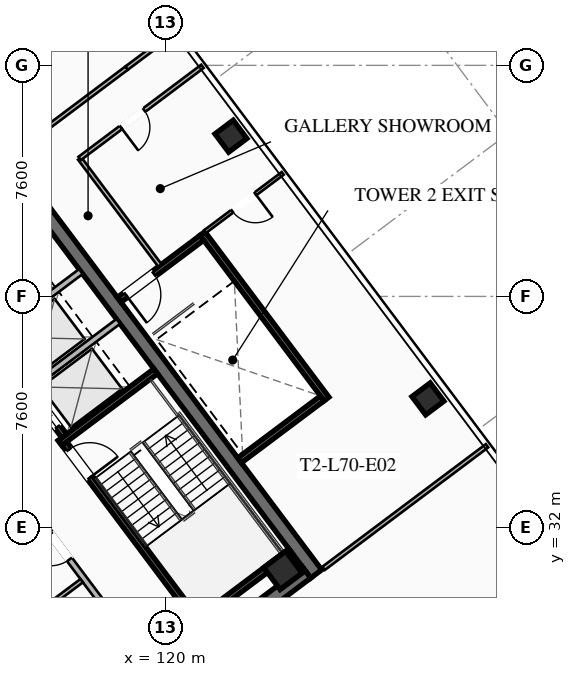
"""IFC4 building model, lengths in metres.
Left out: names, types, materials, properties, quantities, classifications, styles, units other than length and angle.
Written with IfcOpenShell. Run it as: python <this file> out.ifc"""

import sys

from ifc_helpers import new_model, si_unit, direction, frame, frame_2d, origin, origin_2d, place, context, subcontext, project, spatial, rectangle, hollow_rectangle, extrude, element, fill, save


model = new_model("IFC4")
c1 = context("Model", 3, precision=1e-05, world=origin(), true_north=direction((0.0, 1.0)))
c2 = subcontext(c1, "Body", "Model", "MODEL_VIEW")
j1 = project(units=[si_unit("LENGTHUNIT", "METRE"), si_unit("PLANEANGLEUNIT", "RADIAN")], contexts=[c1])
p1 = place(None, origin())
s1 = spatial("IfcSite", under=j1, at=p1, CompositionType="ELEMENT")
p2 = place(p1, origin())
s2 = spatial("IfcBuilding", under=s1, at=p2, CompositionType="ELEMENT")
p3 = place(p2, frame((0.0, 0.0, 259.4)))
s3 = spatial("IfcBuildingStorey", under=s2, at=p3, CompositionType="ELEMENT", Elevation=259.4)
p4 = place(p3, frame((115.604, 42.953, 0.0), z_axis=(0.0, 0.0, 1.0), x_axis=(0.600005007985, -0.799996243986, 0.0)))
e1 = element("IfcWall", 1, at=p4, inside=s3, PredefinedType="SHEAR", context=c2, shape_type="SweptSolid", body=[
    extrude(rectangle(XDim=15.6, YDim=0.45, at=frame_2d((7.8, 0.0))), origin(), (0.0, 0.0, 1.0), 4.0),
])
p5 = place(p3, frame((124.649, 30.518, 0.0), z_axis=(0.0, 0.0, 1.0), x_axis=(-0.8, -0.6, 0.0)))
e2 = element("IfcWall", 2, at=p5, inside=s3, PredefinedType="SHEAR", context=c2, shape_type="SweptSolid", body=[
    extrude(rectangle(XDim=15.26, YDim=0.45, at=frame_2d((7.63, 0.0))), origin(), (0.0, 0.0, 1.0), 4.0),
])
p6 = place(p5, frame((9.33, 0.0, 0.0)))
e3 = element("IfcOpeningElement", 3, at=p6, cuts=e2, PredefinedType="OPENING", context=c2, shape_type="SweptSolid", body=[
    extrude(rectangle(XDim=1.25, YDim=2.25, at=frame_2d((0.625, 1.125))), frame((0.0, 0.235, 0.0), z_axis=(0.0, -1.0, 0.0), x_axis=(1.0, 0.0, 0.0)), (0.0, 0.0, 1.0), 0.47),
])
p7 = place(p5, frame((4.28, 0.0, 0.0)))
e4 = element("IfcOpeningElement", 4, at=p7, cuts=e2, PredefinedType="OPENING", context=c2, shape_type="SweptSolid", body=[
    extrude(rectangle(XDim=1.25, YDim=2.25, at=frame_2d((0.625, 1.125))), frame((0.0, 0.235, 0.0), z_axis=(0.0, -1.0, 0.0), x_axis=(1.0, 0.0, 0.0)), (0.0, 0.0, 1.0), 0.47),
])
p8 = place(p3, frame((123.87, 30.59, 0.0), z_axis=(0.0, 0.0, 1.0), x_axis=(0.799999996291, 0.600000004945, 0.0)))
e5 = element("IfcColumn", 5, at=p8, inside=s3, PredefinedType="COLUMN", context=c2, shape_type="SweptSolid", body=[
    extrude(hollow_rectangle(XDim=0.9, YDim=0.9, WallThickness=0.04, at=origin_2d()), origin(), (0.0, 0.0, 1.0), 3.7),
])
for number, where, z_axis, x_axis in (
    (6, (128.64, 36.23, 0.0), (0.0, 0.0, 1.0), (0.8, 0.6, 0.0)),
    (7, (122.16, 44.87, 0.0), (0.0, 0.0, 1.0), (0.8, 0.6, 0.0)),
):
    element("IfcColumn", number, at=place(p3, frame(where, z_axis=z_axis, x_axis=x_axis)), inside=s3, PredefinedType="COLUMN", context=c2, shape_type="SweptSolid", body=[
        extrude(hollow_rectangle(XDim=0.75, YDim=0.75, WallThickness=0.032, at=origin_2d()), origin(), (0.0, 0.0, 1.0), 3.7),
    ])
p9 = place(p3, frame((116.56, 34.92, 0.0), z_axis=(0.0, 0.0, 1.0), x_axis=(0.59999041401, -0.800007189403, 0.0)))
e8 = element("IfcWall", 8, at=p9, inside=s3, PredefinedType="SHEAR", context=c2, shape_type="SweptSolid", body=[
    extrude(rectangle(XDim=8.15, YDim=0.2, at=frame_2d((4.075, 0.0))), origin(), (0.0, 0.0, 1.0), 3.7),
])
p10 = place(p9, frame((0.45, 0.0, 0.0)))
e9 = element("IfcOpeningElement", 9, at=p10, cuts=e8, PredefinedType="OPENING", context=c2, shape_type="SweptSolid", body=[
    extrude(rectangle(XDim=1.15, YDim=2.2, at=frame_2d((0.575, 1.1))), frame((0.0, 0.11, 0.0), z_axis=(0.0, -1.0, 0.0), x_axis=(1.0, 0.0, 0.0)), (0.0, 0.0, 1.0), 0.22),
])
for number, where, z_axis, x_axis in (
    (10, (116.54, 34.78, 0.0), (0.0, 0.0, 1.0), (0.8, 0.6, 0.0)),
    (11, (120.98, 28.86, 0.0), (0.0, 0.0, 1.0), (0.8, 0.6, 0.0)),
):
    element("IfcWall", number, at=place(p3, frame(where, z_axis=z_axis, x_axis=x_axis)), inside=s3, PredefinedType="SHEAR", context=c2, shape_type="SweptSolid", body=[
        extrude(rectangle(XDim=3.93, YDim=0.2, at=frame_2d((1.965, 0.0))), origin(), (0.0, 0.0, 1.0), 3.7),
    ])
p11 = place(p3, frame((118.058, 25.856, 0.0), z_axis=(0.0, 0.0, 1.0), x_axis=(-0.600002657301, 0.799998007018, 0.0)))
e12 = element("IfcWall", 12, at=p11, inside=s3, PredefinedType="SHEAR", context=c2, shape_type="SweptSolid", body=[
    extrude(rectangle(XDim=14.7, YDim=0.2, at=frame_2d((7.35, 0.0))), origin(), (0.0, 0.0, 1.0), 3.7),
])
p12 = place(p3, frame((112.75, 40.25, 0.0), z_axis=(0.0, 0.0, 1.0), x_axis=(0.599994036198, -0.800004472816, 0.0)))
e13 = element("IfcWall", 13, at=p12, inside=s3, PredefinedType="SHEAR", context=c2, shape_type="SweptSolid", body=[
    extrude(rectangle(XDim=6.55, YDim=0.2, at=frame_2d((3.275, 0.0))), origin(), (0.0, 0.0, 1.0), 3.7),
])
p13 = place(p12, frame((5.075, 0.0, 0.0)))
e14 = element("IfcOpeningElement", 14, at=p13, cuts=e13, PredefinedType="OPENING", context=c2, shape_type="SweptSolid", body=[
    extrude(rectangle(XDim=1.1, YDim=2.2, at=frame_2d((0.55, 1.1))), frame((0.0, 0.11, 0.0), z_axis=(0.0, -1.0, 0.0), x_axis=(1.0, 0.0, 0.0)), (0.0, 0.0, 1.0), 0.22),
])
p14 = place(p12, frame((3.025, 0.0, 0.0)))
e15 = element("IfcOpeningElement", 15, at=p14, cuts=e13, PredefinedType="OPENING", context=c2, shape_type="SweptSolid", body=[
    extrude(rectangle(XDim=1.1, YDim=2.2, at=frame_2d((0.55, 1.1))), frame((0.0, 0.11, 0.0), z_axis=(0.0, -1.0, 0.0), x_axis=(1.0, 0.0, 0.0)), (0.0, 0.0, 1.0), 0.22),
])
p15 = place(p12, frame((1.025, 0.0, 0.0)))
e16 = element("IfcOpeningElement", 16, at=p15, cuts=e13, PredefinedType="OPENING", context=c2, shape_type="SweptSolid", body=[
    extrude(rectangle(XDim=1.1, YDim=2.2, at=frame_2d((0.55, 1.1))), frame((0.0, 0.11, 0.0), z_axis=(0.0, -1.0, 0.0), x_axis=(1.0, 0.0, 0.0)), (0.0, 0.0, 1.0), 0.22),
])
for number, where, z_axis, x_axis in (
    (17, (115.59, 36.63, 0.0), (0.0, 0.0, 1.0), (0.8, 0.6, 0.0)),
    (18, (114.36, 38.27, 0.0), (0.0, 0.0, 1.0), (0.8, 0.6, 0.0)),
):
    element("IfcWall", number, at=place(p3, frame(where, z_axis=z_axis, x_axis=x_axis)), inside=s3, PredefinedType="SOLIDWALL", context=c2, shape_type="SweptSolid", body=[
        extrude(rectangle(XDim=3.58, YDim=0.2, at=frame_2d((1.79, 0.0))), origin(), (0.0, 0.0, 1.0), 3.7),
    ])
p16 = place(p3, frame((119.73, 27.11, 0.0), z_axis=(0.0, 0.0, 1.0), x_axis=(-0.600005580459, 0.799995814625, 0.0)))
e19 = element("IfcWall", 19, at=p16, inside=s3, PredefinedType="SOLIDWALL", context=c2, shape_type="SweptSolid", body=[
    extrude(rectangle(XDim=7.0, YDim=0.2, at=frame_2d((3.5, 0.0))), origin(), (0.0, 0.0, 1.0), 2.659),
])
p17 = place(p16, frame((0.85, 0.0, 0.0)))
e20 = element("IfcOpeningElement", 20, at=p17, cuts=e19, PredefinedType="OPENING", context=c2, shape_type="SweptSolid", body=[
    extrude(rectangle(XDim=0.95, YDim=2.05, at=frame_2d((0.475, 1.025))), frame((0.0, 0.11, 0.0), z_axis=(0.0, -1.0, 0.0), x_axis=(1.0, 0.0, 0.0)), (0.0, 0.0, 1.0), 0.22),
])
p18 = place(p16, frame((4.8, 0.0, 0.0)))
e21 = element("IfcOpeningElement", 21, at=p18, cuts=e19, PredefinedType="OPENING", context=c2, shape_type="SweptSolid", body=[
    extrude(rectangle(XDim=1.05, YDim=2.2, at=frame_2d((0.525, 1.1))), frame((0.0, 0.11, 0.0), z_axis=(0.0, -1.0, 0.0), x_axis=(1.0, 0.0, 0.0)), (0.0, 0.0, 1.0), 0.22),
])
p19 = place(p3, frame((115.746, 29.122, 0.0), z_axis=(0.0, 0.0, 1.0), x_axis=(0.8, 0.6, 0.0)))
e22 = element("IfcWall", 22, at=p19, inside=s3, PredefinedType="PARTITIONING", context=c2, shape_type="SweptSolid", body=[
    extrude(rectangle(XDim=1.88, YDim=0.135, at=frame_2d((0.94, 0.0))), origin(), (0.0, 0.0, 1.0), 2.659),
])
p20 = place(p3, frame((125.304, 36.228, 0.0), z_axis=(0.0, 0.0, 1.0), x_axis=(-0.59998851072, 0.800008616831, 0.0)))
e23 = element("IfcWall", 23, at=p20, inside=s3, PredefinedType="SHEAR", context=c2, shape_type="SweptSolid", body=[
    extrude(rectangle(XDim=6.8, YDim=0.2, at=frame_2d((3.4, 0.0))), origin(), (0.0, 0.0, 1.0), 3.7),
])
p21 = place(p3, frame((121.204, 41.528, 0.0), z_axis=(0.0, 0.0, 1.0), x_axis=(-0.800017232136, -0.599977023131, 0.0)))
e24 = element("IfcWall", 24, at=p21, inside=s3, PredefinedType="SHEAR", context=c2, shape_type="SweptSolid", body=[
    extrude(rectangle(XDim=3.4, YDim=0.2, at=frame_2d((1.7, 0.0))), origin(), (0.0, 0.0, 1.0), 3.7),
])
p22 = place(p21, frame((1.975, 0.0, 0.0)))
e25 = element("IfcOpeningElement", 25, at=p22, cuts=e24, PredefinedType="OPENING", context=c2, shape_type="SweptSolid", body=[
    extrude(rectangle(XDim=1.15, YDim=2.2, at=frame_2d((0.575, 1.1))), frame((0.0, 0.11, 0.0), z_axis=(0.0, -1.0, 0.0), x_axis=(1.0, 0.0, 0.0)), (0.0, 0.0, 1.0), 0.22),
])
p23 = place(p3, frame((122.444, 34.208, 0.0), z_axis=(0.0, 0.0, 1.0), x_axis=(0.79999138319, 0.600011488909, 0.0)))
e26 = element("IfcWall", 26, at=p23, inside=s3, PredefinedType="SHEAR", context=c2, shape_type="SweptSolid", body=[
    extrude(rectangle(XDim=3.4, YDim=0.2, at=frame_2d((1.7, 0.0))), origin(), (0.0, 0.0, 1.0), 3.7),
])
p24 = place(p3, frame((119.824, 40.618, 0.0), z_axis=(0.0, 0.0, 1.0), x_axis=(-0.599982243973, 0.800013316712, 0.0)))
e27 = element("IfcWall", 27, at=p24, inside=s3, PredefinedType="PARTITIONING", context=c2, shape_type="SweptSolid", body=[
    extrude(rectangle(XDim=4.4, YDim=0.135, at=frame_2d((2.2, 0.0))), origin(), (0.0, 0.0, 1.0), 2.659),
])
p25 = place(p3, frame((99.65, 32.8, 0.0), z_axis=(0.0, 0.0, 1.0), x_axis=(0.8, 0.6, 0.0)))
e28 = element("IfcWall", 28, at=p25, inside=s3, PredefinedType="PARTITIONING", context=c2, shape_type="SweptSolid", body=[
    extrude(rectangle(XDim=23.85, YDim=0.135, at=frame_2d((11.925, 0.0))), origin(), (0.0, 0.0, 1.0), 2.659),
])
p26 = place(p25, frame((6.567, 0.0, 0.0)))
e29 = element("IfcOpeningElement", 29, at=p26, cuts=e28, PredefinedType="OPENING", context=c2, shape_type="SweptSolid", body=[
    extrude(rectangle(XDim=0.95, YDim=2.05, at=frame_2d((0.475, 1.025))), frame((0.0, 0.077, 0.0), z_axis=(0.0, -1.0, 0.0), x_axis=(1.0, 0.0, 0.0)), (0.0, 0.0, 1.0), 0.155),
])
p27 = place(p25, frame((10.788, 0.0, 0.0)))
e30 = element("IfcOpeningElement", 30, at=p27, cuts=e28, PredefinedType="OPENING", context=c2, shape_type="SweptSolid", body=[
    extrude(rectangle(XDim=0.95, YDim=2.05, at=frame_2d((0.475, 1.025))), frame((0.0, 0.077, 0.0), z_axis=(0.0, -1.0, 0.0), x_axis=(1.0, 0.0, 0.0)), (0.0, 0.0, 1.0), 0.155),
])
p28 = place(p3, frame((118.73, 47.11, 0.0), z_axis=(0.0, 0.0, 1.0), x_axis=(0.800057727462, 0.599923022336, 0.0)))
e31 = element("IfcWall", 31, at=p28, inside=s3, PredefinedType="PARTITIONING", context=c2, shape_type="SweptSolid", body=[
    extrude(rectangle(XDim=2.03, YDim=0.135, at=frame_2d((1.015, 0.0))), origin(), (0.0, 0.0, 1.0), 2.659),
])
p29 = place(p3, frame((121.224, 47.168, 0.0), z_axis=(0.0, 0.0, 1.0), x_axis=(-0.8, -0.6, 0.0)))
e32 = element("IfcWall", 32, at=p29, inside=s3, PredefinedType="PARTITIONING", context=c2, shape_type="SweptSolid", body=[
    extrude(rectangle(XDim=5.05, YDim=0.135, at=frame_2d((2.525, 0.0))), origin(), (0.0, 0.0, 1.0), 2.659),
])
p30 = place(p29, frame((2.4, 0.0, 0.0)))
e33 = element("IfcOpeningElement", 33, at=p30, cuts=e32, PredefinedType="OPENING", context=c2, shape_type="SweptSolid", body=[
    extrude(rectangle(XDim=0.95, YDim=2.05, at=frame_2d((0.475, 1.025))), frame((0.0, 0.077, 0.0), z_axis=(0.0, -1.0, 0.0), x_axis=(1.0, 0.0, 0.0)), (0.0, 0.0, 1.0), 0.155),
])
p31 = place(p3, frame((125.208, 30.656, 0.0), z_axis=(0.0, 0.0, 1.0), x_axis=(0.8, 0.6, 0.0)))
e34 = element("IfcWall", 34, at=p31, inside=s3, PredefinedType="PARTITIONING", context=c2, shape_type="SweptSolid", body=[
    extrude(rectangle(XDim=6.72, YDim=0.135, at=frame_2d((3.36, 0.0))), origin(), (0.0, 0.0, 1.0), 2.659),
])
p32 = place(p3, frame((123.864, 43.648, 0.0), z_axis=(0.0, 0.0, 1.0), x_axis=(-0.800018310174, -0.599975585658, 0.0)))
e35 = element("IfcWall", 35, at=p32, inside=s3, PredefinedType="PARTITIONING", context=c2, shape_type="SweptSolid", body=[
    extrude(rectangle(XDim=3.2, YDim=0.11, at=frame_2d((1.6, 0.0))), origin(), (0.0, 0.0, 1.0), 2.659),
])
p33 = place(p32, frame((1.125, 0.0, 0.0)))
e36 = element("IfcOpeningElement", 36, at=p33, cuts=e35, PredefinedType="OPENING", context=c2, shape_type="SweptSolid", body=[
    extrude(rectangle(XDim=0.95, YDim=2.05, at=frame_2d((0.475, 1.025))), frame((0.0, 0.065, 0.0), z_axis=(0.0, -1.0, 0.0), x_axis=(1.0, 0.0, 0.0)), (0.0, 0.0, 1.0), 0.13),
])
p34 = place(p10, origin())
e37 = element("IfcDoor", 37, at=p34, inside=s3, OperationType="SINGLE_SWING_RIGHT", PredefinedType="DOOR", context=c2, shape_type="SweptSolid", body=[
    extrude(rectangle(XDim=1.15, YDim=2.2, at=frame_2d((0.575, 1.1))), frame((0.0, 0.025, 0.0), z_axis=(0.0, -1.0, 0.0), x_axis=(1.0, 0.0, 0.0)), (0.0, 0.0, 1.0), 0.05),
])
fill(e9, e37)
p35 = place(p18, origin())
e38 = element("IfcDoor", 38, at=p35, inside=s3, OperationType="SINGLE_SWING_RIGHT", PredefinedType="DOOR", context=c2, shape_type="SweptSolid", body=[
    extrude(rectangle(XDim=1.05, YDim=2.2, at=frame_2d((0.525, 1.1))), frame((0.0, 0.025, 0.0), z_axis=(0.0, -1.0, 0.0), x_axis=(1.0, 0.0, 0.0)), (0.0, 0.0, 1.0), 0.05),
])
fill(e21, e38)
p36 = place(p22, origin())
e39 = element("IfcDoor", 39, at=p36, inside=s3, OperationType="SINGLE_SWING_RIGHT", PredefinedType="DOOR", context=c2, shape_type="SweptSolid", body=[
    extrude(rectangle(XDim=1.15, YDim=2.2, at=frame_2d((0.575, 1.1))), frame((0.0, 0.025, 0.0), z_axis=(0.0, -1.0, 0.0), x_axis=(1.0, 0.0, 0.0)), (0.0, 0.0, 1.0), 0.05),
])
fill(e25, e39)
p37 = place(p30, origin())
e40 = element("IfcDoor", 40, at=p37, inside=s3, OperationType="SINGLE_SWING_RIGHT", PredefinedType="DOOR", context=c2, shape_type="SweptSolid", body=[
    extrude(rectangle(XDim=0.95, YDim=2.05, at=frame_2d((0.475, 1.025))), frame((0.0, 0.025, 0.0), z_axis=(0.0, -1.0, 0.0), x_axis=(1.0, 0.0, 0.0)), (0.0, 0.0, 1.0), 0.05),
])
fill(e33, e40)
p38 = place(p33, origin())
e41 = element("IfcDoor", 41, at=p38, inside=s3, OperationType="SINGLE_SWING_LEFT", PredefinedType="DOOR", context=c2, shape_type="SweptSolid", body=[
    extrude(rectangle(XDim=0.95, YDim=2.05, at=frame_2d((0.475, 1.025))), frame((0.0, 0.025, 0.0), z_axis=(0.0, -1.0, 0.0), x_axis=(1.0, 0.0, 0.0)), (0.0, 0.0, 1.0), 0.05),
])
fill(e36, e41)
p39 = place(p13, origin())
e42 = element("IfcDoor", 42, at=p39, inside=s3, OperationType="SLIDING_TO_LEFT", PredefinedType="DOOR", context=c2, shape_type="SweptSolid", body=[
    extrude(rectangle(XDim=1.1, YDim=2.2, at=frame_2d((0.55, 1.1))), frame((0.0, 0.025, 0.0), z_axis=(0.0, -1.0, 0.0), x_axis=(1.0, 0.0, 0.0)), (0.0, 0.0, 1.0), 0.05),
])
fill(e14, e42)
save(model, sys.argv[1])
